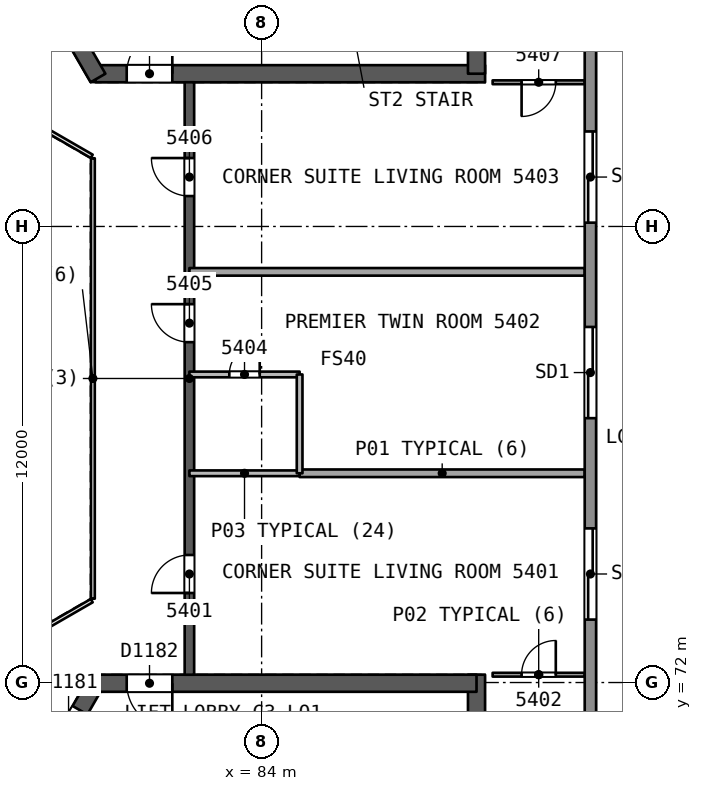
"""IFC4 building model, lengths in metres.
Left out: names, types, materials, properties, quantities, classifications, styles, units other than length and angle.
Written with IfcOpenShell. Run it as: python <this file> out.ifc"""

import sys

from ifc_helpers import new_model, si_unit, direction, frame, frame_2d, origin, place, context, subcontext, project, spatial, rectangle, extrude, element, fill, save


model = new_model("IFC4")
c1 = context("Model", 3, precision=1e-05, world=origin(), true_north=direction((0.0, 1.0)))
c2 = subcontext(c1, "Body", "Model", "MODEL_VIEW")
j1 = project(units=[si_unit("LENGTHUNIT", "METRE"), si_unit("PLANEANGLEUNIT", "RADIAN")], contexts=[c1])
p1 = place(None, origin())
s1 = spatial("IfcSite", under=j1, at=p1, CompositionType="ELEMENT")
p2 = place(p1, origin())
s2 = spatial("IfcBuilding", under=s1, at=p2, CompositionType="ELEMENT")
p3 = place(p2, frame((0.0, 0.0, 220.6)))
s3 = spatial("IfcBuildingStorey", under=s2, at=p3, CompositionType="ELEMENT", Elevation=220.6)
p4 = place(p3, frame((79.63, 88.019, 0.0), z_axis=(0.0, 0.0, 1.0), x_axis=(1.0, 0.0, 0.0)))
e1 = element("IfcWall", 1, at=p4, inside=s3, PredefinedType="SHEAR", context=c2, shape_type="SweptSolid", body=[
    extrude(rectangle(XDim=10.25, YDim=0.45, at=frame_2d((5.125, 0.0))), origin(), (0.0, 0.0, 1.0), 3.7),
])
p5 = place(p4, frame((0.82, 0.0, 0.0)))
e2 = element("IfcOpeningElement", 2, at=p5, cuts=e1, PredefinedType="OPENING", context=c2, shape_type="SweptSolid", body=[
    extrude(rectangle(XDim=1.2, YDim=2.1, at=frame_2d((0.6, 1.05))), frame((0.0, 0.235, 0.0), z_axis=(0.0, -1.0, 0.0), x_axis=(1.0, 0.0, 0.0)), (0.0, 0.0, 1.0), 0.471),
])
p6 = place(p3, frame((89.655, 88.019, 0.0), z_axis=(0.0, 0.0, 1.0), x_axis=(0.0, 1.0, 0.0)))
e3 = element("IfcWall", 3, at=p6, inside=s3, PredefinedType="SHEAR", context=c2, shape_type="SweptSolid", body=[
    extrude(rectangle(XDim=14.108, YDim=0.45, at=frame_2d((7.054, 0.0))), origin(), (0.0, 0.0, 1.0), 3.7),
])
p7 = place(p3, frame((74.617, 96.701, 0.0), z_axis=(0.0, 0.0, 1.0), x_axis=(0.499994385119, -0.866028645513, 0.0)))
e4 = element("IfcWall", 4, at=p7, inside=s3, PredefinedType="SHEAR", context=c2, shape_type="SweptSolid", body=[
    extrude(rectangle(XDim=10.155, YDim=0.45, at=frame_2d((5.077, 0.0))), origin(), (0.0, 0.0, 1.0), 3.7),
])
p8 = place(p7, frame((8.005, 0.0, 0.0)))
e5 = element("IfcOpeningElement", 5, at=p8, cuts=e4, PredefinedType="OPENING", context=c2, shape_type="SweptSolid", body=[
    extrude(rectangle(XDim=1.2, YDim=2.1, at=frame_2d((0.6, 1.05))), frame((0.0, 0.235, 0.0), z_axis=(0.0, -1.0, 0.0), x_axis=(1.0, 0.0, 0.0)), (0.0, 0.0, 1.0), 0.471),
])
p9 = place(p3, frame((79.63, 71.981, 0.0), z_axis=(0.0, 0.0, 1.0), x_axis=(-0.500002171595, -0.86602415001, 0.0)))
e6 = element("IfcWall", 6, at=p9, inside=s3, PredefinedType="SHEAR", context=c2, shape_type="SweptSolid", body=[
    extrude(rectangle(XDim=10.25, YDim=0.45, at=frame_2d((5.125, 0.0))), origin(), (0.0, 0.0, 1.0), 3.7),
])
p10 = place(p9, frame((0.82, 0.0, 0.0)))
e7 = element("IfcOpeningElement", 7, at=p10, cuts=e6, PredefinedType="OPENING", context=c2, shape_type="SweptSolid", body=[
    extrude(rectangle(XDim=1.2, YDim=2.1, at=frame_2d((0.6, 1.05))), frame((0.0, 0.235, 0.0), z_axis=(0.0, -1.0, 0.0), x_axis=(1.0, 0.0, 0.0)), (0.0, 0.0, 1.0), 0.471),
])
p11 = place(p3, frame((89.655, 58.002, 0.0), z_axis=(0.0, 0.0, 1.0), x_axis=(0.0, 1.0, 0.0)))
e8 = element("IfcWall", 8, at=p11, inside=s3, PredefinedType="SHEAR", context=c2, shape_type="SweptSolid", body=[
    extrude(rectangle(XDim=14.204, YDim=0.45, at=frame_2d((7.102, 0.0))), origin(), (0.0, 0.0, 1.0), 3.7),
])
p12 = place(p3, frame((89.655, 71.981, 0.0), z_axis=(0.0, 0.0, 1.0), x_axis=(-1.0, 0.0, 0.0)))
e9 = element("IfcWall", 9, at=p12, inside=s3, PredefinedType="SHEAR", context=c2, shape_type="SweptSolid", body=[
    extrude(rectangle(XDim=10.155, YDim=0.45, at=frame_2d((5.078, 0.0))), origin(), (0.0, 0.0, 1.0), 3.7),
])
p13 = place(p12, frame((8.005, 0.0, 0.0)))
e10 = element("IfcOpeningElement", 10, at=p13, cuts=e9, PredefinedType="OPENING", context=c2, shape_type="SweptSolid", body=[
    extrude(rectangle(XDim=1.2, YDim=2.1, at=frame_2d((0.6, 1.05))), frame((0.0, 0.235, 0.0), z_axis=(0.0, -1.0, 0.0), x_axis=(1.0, 0.0, 0.0)), (0.0, 0.0, 1.0), 0.471),
])
p14 = place(p3, frame((82.1, 72.206, 0.0), z_axis=(0.0, 0.0, 1.0), x_axis=(0.0, 1.0, 0.0)))
e11 = element("IfcWall", 11, at=p14, inside=s3, PredefinedType="SHEAR", context=c2, shape_type="SweptSolid", body=[
    extrude(rectangle(XDim=15.588, YDim=0.25, at=frame_2d((7.794, 0.0))), origin(), (0.0, 0.0, 1.0), 3.3),
])
p15 = place(p14, frame((2.15, 0.0, 0.0)))
e12 = element("IfcOpeningElement", 12, at=p15, cuts=e11, PredefinedType="OPENING", context=c2, shape_type="SweptSolid", body=[
    extrude(rectangle(XDim=1.0, YDim=2.1, at=frame_2d((0.5, 1.05))), frame((0.0, 0.135, 0.0), z_axis=(0.0, -1.0, 0.0), x_axis=(1.0, 0.0, 0.0)), (0.0, 0.0, 1.0), 0.271),
])
p16 = place(p14, frame((8.75, 0.0, 0.0)))
e13 = element("IfcOpeningElement", 13, at=p16, cuts=e11, PredefinedType="OPENING", context=c2, shape_type="SweptSolid", body=[
    extrude(rectangle(XDim=1.0, YDim=2.1, at=frame_2d((0.5, 1.05))), frame((0.0, 0.135, 0.0), z_axis=(0.0, -1.0, 0.0), x_axis=(1.0, 0.0, 0.0)), (0.0, 0.0, 1.0), 0.271),
])
p17 = place(p14, frame((12.594, 0.0, 0.0)))
e14 = element("IfcOpeningElement", 14, at=p17, cuts=e11, PredefinedType="OPENING", context=c2, shape_type="SweptSolid", body=[
    extrude(rectangle(XDim=1.0, YDim=2.1, at=frame_2d((0.5, 1.05))), frame((0.0, 0.135, 0.0), z_axis=(0.0, -1.0, 0.0), x_axis=(1.0, 0.0, 0.0)), (0.0, 0.0, 1.0), 0.271),
])
p18 = place(p3, frame((90.079, 72.206, 0.0), z_axis=(0.0, 0.0, 1.0), x_axis=(1.0, 0.0, 0.0)))
e15 = element("IfcWall", 15, at=p18, inside=s3, PredefinedType="PARTITIONING", context=c2, shape_type="SweptSolid", body=[
    extrude(rectangle(XDim=2.424, YDim=0.1, at=frame_2d((1.212, 0.0))), origin(), (0.0, 0.0, 1.0), 3.3),
])
p19 = place(p18, frame((0.762, 0.0, 0.0)))
e16 = element("IfcOpeningElement", 16, at=p19, cuts=e15, PredefinedType="OPENING", context=c2, shape_type="SweptSolid", body=[
    extrude(rectangle(XDim=0.9, YDim=2.1, at=frame_2d((0.45, 1.05))), frame((0.0, 0.061, 0.0), z_axis=(0.0, -1.0, 0.0), x_axis=(1.0, 0.0, 0.0)), (0.0, 0.0, 1.0), 0.121),
])
p20 = place(p3, frame((92.503, 77.506, 0.0), z_axis=(0.0, 0.0, 1.0), x_axis=(-1.0, 0.0, 0.0)))
e17 = element("IfcWall", 17, at=p20, inside=s3, PredefinedType="PARTITIONING", context=c2, shape_type="SweptSolid", body=[
    extrude(rectangle(XDim=7.503, YDim=0.2, at=frame_2d((3.751, 0.0))), origin(), (0.0, 0.0, 1.0), 3.3),
])
p21 = place(p3, frame((85.0, 77.506, 0.0), z_axis=(0.0, 0.0, 1.0), x_axis=(-1.0, 0.0, 0.0)))
e18 = element("IfcWall", 18, at=p21, inside=s3, PredefinedType="PARTITIONING", context=c2, shape_type="SweptSolid", body=[
    extrude(rectangle(XDim=2.9, YDim=0.15, at=frame_2d((1.45, 0.0))), origin(), (0.0, 0.0, 1.0), 3.3),
])
p22 = place(p3, frame((82.1, 80.106, 0.0), z_axis=(0.0, 0.0, 1.0), x_axis=(1.0, 0.0, 0.0)))
e19 = element("IfcWall", 19, at=p22, inside=s3, PredefinedType="PARTITIONING", context=c2, shape_type="SweptSolid", body=[
    extrude(rectangle(XDim=2.9, YDim=0.15, at=frame_2d((1.45, 0.0))), origin(), (0.0, 0.0, 1.0), 3.3),
])
p23 = place(p22, frame((1.05, 0.0, 0.0)))
e20 = element("IfcOpeningElement", 20, at=p23, cuts=e19, PredefinedType="OPENING", context=c2, shape_type="SweptSolid", body=[
    extrude(rectangle(XDim=0.8, YDim=2.1, at=frame_2d((0.4, 1.05))), frame((0.0, 0.085, 0.0), z_axis=(0.0, -1.0, 0.0), x_axis=(1.0, 0.0, 0.0)), (0.0, 0.0, 1.0), 0.171),
])
p24 = place(p3, frame((85.0, 80.106, 0.0), z_axis=(0.0, 0.0, 1.0), x_axis=(0.0, -1.0, 0.0)))
e21 = element("IfcWall", 21, at=p24, inside=s3, PredefinedType="PARTITIONING", context=c2, shape_type="SweptSolid", body=[
    extrude(rectangle(XDim=2.6, YDim=0.15, at=frame_2d((1.3, 0.0))), origin(), (0.0, 0.0, 1.0), 3.3),
])
p25 = place(p3, frame((92.503, 82.806, 0.0), z_axis=(0.0, 0.0, 1.0), x_axis=(-1.0, 0.0, 0.0)))
e22 = element("IfcWall", 22, at=p25, inside=s3, PredefinedType="PARTITIONING", context=c2, shape_type="SweptSolid", body=[
    extrude(rectangle(XDim=10.403, YDim=0.2, at=frame_2d((5.201, 0.0))), origin(), (0.0, 0.0, 1.0), 3.3),
])
p26 = place(p3, frame((92.503, 87.794, 0.0), z_axis=(0.0, 0.0, 1.0), x_axis=(-1.0, 0.0, 0.0)))
e23 = element("IfcWall", 23, at=p26, inside=s3, PredefinedType="PARTITIONING", context=c2, shape_type="SweptSolid", body=[
    extrude(rectangle(XDim=2.424, YDim=0.1, at=frame_2d((1.212, 0.0))), origin(), (0.0, 0.0, 1.0), 3.3),
])
p27 = place(p26, frame((0.762, 0.0, 0.0)))
e24 = element("IfcOpeningElement", 24, at=p27, cuts=e23, PredefinedType="OPENING", context=c2, shape_type="SweptSolid", body=[
    extrude(rectangle(XDim=0.9, YDim=2.1, at=frame_2d((0.45, 1.05))), frame((0.0, 0.061, 0.0), z_axis=(0.0, -1.0, 0.0), x_axis=(1.0, 0.0, 0.0)), (0.0, 0.0, 1.0), 0.121),
])
p28 = place(p3, frame((92.652, 105.381, 0.0), z_axis=(0.0, 0.0, 1.0), x_axis=(0.0, -1.0, 0.0)))
e25 = element("IfcWall", 25, at=p28, inside=s3, PredefinedType="SOLIDWALL", context=c2, shape_type="SweptSolid", body=[
    extrude(rectangle(XDim=50.762, YDim=0.3, at=frame_2d((25.381, 0.0))), origin(), (0.0, 0.0, 1.0), 3.3),
])
p29 = place(p28, frame((29.325, 0.0, 0.0)))
e26 = element("IfcOpeningElement", 26, at=p29, cuts=e25, PredefinedType="OPENING", context=c2, shape_type="SweptSolid", body=[
    extrude(rectangle(XDim=2.4, YDim=2.4, at=frame_2d((1.2, 1.2))), frame((0.0, 0.161, 0.0), z_axis=(0.0, -1.0, 0.0), x_axis=(1.0, 0.0, 0.0)), (0.0, 0.0, 1.0), 0.321),
])
p30 = place(p28, frame((39.492, 0.0, 0.0)))
e27 = element("IfcOpeningElement", 27, at=p30, cuts=e25, PredefinedType="OPENING", context=c2, shape_type="SweptSolid", body=[
    extrude(rectangle(XDim=2.4, YDim=2.4, at=frame_2d((1.2, 1.2))), frame((0.0, 0.161, 0.0), z_axis=(0.0, -1.0, 0.0), x_axis=(1.0, 0.0, 0.0)), (0.0, 0.0, 1.0), 0.321),
])
p31 = place(p28, frame((18.881, 0.0, 0.0)))
e28 = element("IfcOpeningElement", 28, at=p31, cuts=e25, PredefinedType="OPENING", context=c2, shape_type="SweptSolid", body=[
    extrude(rectangle(XDim=2.4, YDim=2.4, at=frame_2d((1.2, 1.2))), frame((0.0, 0.161, 0.0), z_axis=(0.0, -1.0, 0.0), x_axis=(1.0, 0.0, 0.0)), (0.0, 0.0, 1.0), 0.321),
])
p32 = place(p28, frame((8.878, 0.0, 0.0)))
e29 = element("IfcOpeningElement", 29, at=p32, cuts=e25, PredefinedType="OPENING", context=c2, shape_type="SweptSolid", body=[
    extrude(rectangle(XDim=2.4, YDim=2.4, at=frame_2d((1.2, 1.2))), frame((0.0, 0.161, 0.0), z_axis=(0.0, -1.0, 0.0), x_axis=(1.0, 0.0, 0.0)), (0.0, 0.0, 1.0), 0.321),
])
p33 = place(p28, frame((24.025, 0.0, 0.0)))
e30 = element("IfcOpeningElement", 30, at=p33, cuts=e25, PredefinedType="OPENING", context=c2, shape_type="SweptSolid", body=[
    extrude(rectangle(XDim=2.4, YDim=2.4, at=frame_2d((1.2, 1.2))), frame((0.0, 0.161, 0.0), z_axis=(0.0, -1.0, 0.0), x_axis=(1.0, 0.0, 0.0)), (0.0, 0.0, 1.0), 0.321),
])
p34 = place(p3, frame((44.193, 82.596, 0.0), z_axis=(0.0, 0.0, 1.0), x_axis=(0.866024521231, 0.500001528624, 0.0)))
e31 = element("IfcWall", 31, at=p34, inside=s3, PredefinedType="SOLIDWALL", context=c2, shape_type="SweptSolid", body=[
    extrude(rectangle(XDim=50.762, YDim=0.3, at=frame_2d((25.381, 0.0))), origin(), (0.0, 0.0, 1.0), 3.3),
])
p35 = place(p34, frame((24.337, 0.0, 0.0)))
e32 = element("IfcOpeningElement", 32, at=p35, cuts=e31, PredefinedType="OPENING", context=c2, shape_type="SweptSolid", body=[
    extrude(rectangle(XDim=2.4, YDim=2.4, at=frame_2d((1.2, 1.2))), frame((0.0, 0.161, 0.0), z_axis=(0.0, -1.0, 0.0), x_axis=(1.0, 0.0, 0.0)), (0.0, 0.0, 1.0), 0.321),
])
p36 = place(p34, frame((29.325, 0.0, 0.0)))
e33 = element("IfcOpeningElement", 33, at=p36, cuts=e31, PredefinedType="OPENING", context=c2, shape_type="SweptSolid", body=[
    extrude(rectangle(XDim=2.4, YDim=2.4, at=frame_2d((1.2, 1.2))), frame((0.0, 0.161, 0.0), z_axis=(0.0, -1.0, 0.0), x_axis=(1.0, 0.0, 0.0)), (0.0, 0.0, 1.0), 0.321),
])
p37 = place(p34, frame((39.492, 0.0, 0.0)))
e34 = element("IfcOpeningElement", 34, at=p37, cuts=e31, PredefinedType="OPENING", context=c2, shape_type="SweptSolid", body=[
    extrude(rectangle(XDim=2.4, YDim=2.4, at=frame_2d((1.2, 1.2))), frame((0.0, 0.161, 0.0), z_axis=(0.0, -1.0, 0.0), x_axis=(1.0, 0.0, 0.0)), (0.0, 0.0, 1.0), 0.321),
])
p38 = place(p34, frame((19.193, 0.0, 0.0)))
e35 = element("IfcOpeningElement", 35, at=p38, cuts=e31, PredefinedType="OPENING", context=c2, shape_type="SweptSolid", body=[
    extrude(rectangle(XDim=2.4, YDim=2.4, at=frame_2d((1.2, 1.2))), frame((0.0, 0.161, 0.0), z_axis=(0.0, -1.0, 0.0), x_axis=(1.0, 0.0, 0.0)), (0.0, 0.0, 1.0), 0.321),
])
p39 = place(p34, frame((8.878, 0.0, 0.0)))
e36 = element("IfcOpeningElement", 36, at=p39, cuts=e31, PredefinedType="OPENING", context=c2, shape_type="SweptSolid", body=[
    extrude(rectangle(XDim=2.4, YDim=2.4, at=frame_2d((1.2, 1.2))), frame((0.0, 0.161, 0.0), z_axis=(0.0, -1.0, 0.0), x_axis=(1.0, 0.0, 0.0)), (0.0, 0.0, 1.0), 0.321),
])
p40 = place(p3, frame((88.155, 52.022, 0.0), z_axis=(0.0, 0.0, 1.0), x_axis=(-0.866024521231, 0.500001528624, 0.0)))
e37 = element("IfcWall", 37, at=p40, inside=s3, PredefinedType="SOLIDWALL", context=c2, shape_type="SweptSolid", body=[
    extrude(rectangle(XDim=50.762, YDim=0.3, at=frame_2d((25.381, 0.0))), origin(), (0.0, 0.0, 1.0), 3.3),
])
p41 = place(p40, frame((23.402, 0.0, 0.0)))
e38 = element("IfcOpeningElement", 38, at=p41, cuts=e37, PredefinedType="OPENING", context=c2, shape_type="SweptSolid", body=[
    extrude(rectangle(XDim=2.4, YDim=2.4, at=frame_2d((1.2, 1.2))), frame((0.0, 0.161, 0.0), z_axis=(0.0, -1.0, 0.0), x_axis=(1.0, 0.0, 0.0)), (0.0, 0.0, 1.0), 0.321),
])
p42 = place(p40, frame((29.013, 0.0, 0.0)))
e39 = element("IfcOpeningElement", 39, at=p42, cuts=e37, PredefinedType="OPENING", context=c2, shape_type="SweptSolid", body=[
    extrude(rectangle(XDim=2.4, YDim=2.4, at=frame_2d((1.2, 1.2))), frame((0.0, 0.161, 0.0), z_axis=(0.0, -1.0, 0.0), x_axis=(1.0, 0.0, 0.0)), (0.0, 0.0, 1.0), 0.321),
])
p43 = place(p40, frame((39.492, 0.0, 0.0)))
e40 = element("IfcOpeningElement", 40, at=p43, cuts=e37, PredefinedType="OPENING", context=c2, shape_type="SweptSolid", body=[
    extrude(rectangle(XDim=2.4, YDim=2.4, at=frame_2d((1.2, 1.2))), frame((0.0, 0.161, 0.0), z_axis=(0.0, -1.0, 0.0), x_axis=(1.0, 0.0, 0.0)), (0.0, 0.0, 1.0), 0.321),
])
p44 = place(p40, frame((18.569, 0.0, 0.0)))
e41 = element("IfcOpeningElement", 41, at=p44, cuts=e37, PredefinedType="OPENING", context=c2, shape_type="SweptSolid", body=[
    extrude(rectangle(XDim=2.4, YDim=2.4, at=frame_2d((1.2, 1.2))), frame((0.0, 0.161, 0.0), z_axis=(0.0, -1.0, 0.0), x_axis=(1.0, 0.0, 0.0)), (0.0, 0.0, 1.0), 0.321),
])
p45 = place(p40, frame((8.878, 0.0, 0.0)))
e42 = element("IfcOpeningElement", 42, at=p45, cuts=e37, PredefinedType="OPENING", context=c2, shape_type="SweptSolid", body=[
    extrude(rectangle(XDim=2.4, YDim=2.4, at=frame_2d((1.2, 1.2))), frame((0.0, 0.161, 0.0), z_axis=(0.0, -1.0, 0.0), x_axis=(1.0, 0.0, 0.0)), (0.0, 0.0, 1.0), 0.321),
])
p46 = place(p3, frame((79.56, 74.206, 0.0), z_axis=(0.0, 0.0, 1.0), x_axis=(0.0, 1.0, 0.0)))
e43 = element("IfcWall", 43, at=p46, inside=s3, PredefinedType="PARTITIONING", context=c2, shape_type="SweptSolid", body=[
    extrude(rectangle(XDim=11.588, YDim=0.1, at=frame_2d((5.794, 0.0))), origin(), (0.0, 0.0, 1.0), 3.3),
])
for number, where, z_axis, x_axis in (
    (44, (79.53, 85.846, 0.0), (0.0, 0.0, 1.0), (-0.866, 0.5, 0.0)),
    (45, (77.798, 73.154, 0.0), (0.0, 0.0, 1.0), (0.866, 0.5, 0.0)),
):
    element("IfcWall", number, at=place(p3, frame(where, z_axis=z_axis, x_axis=x_axis)), inside=s3, PredefinedType="PARTITIONING", context=c2, shape_type="SweptSolid", body=[
        extrude(rectangle(XDim=2.0, YDim=0.1, at=frame_2d((1.0, 0.0))), origin(), (0.0, 0.0, 1.0), 3.3),
    ])
p47 = place(p15, origin())
e46 = element("IfcDoor", 46, at=p47, inside=s3, OperationType="SINGLE_SWING_LEFT", PredefinedType="NOTDEFINED", context=c2, shape_type="SweptSolid", body=[
    extrude(rectangle(XDim=1.0, YDim=2.1, at=frame_2d((0.5, 1.05))), frame((0.0, 0.025, 0.0), z_axis=(0.0, -1.0, 0.0), x_axis=(1.0, 0.0, 0.0)), (0.0, 0.0, 1.0), 0.05),
])
fill(e12, e46)
p48 = place(p19, origin())
e47 = element("IfcDoor", 47, at=p48, inside=s3, OperationType="SINGLE_SWING_RIGHT", PredefinedType="NOTDEFINED", context=c2, shape_type="SweptSolid", body=[
    extrude(rectangle(XDim=0.9, YDim=2.1, at=frame_2d((0.45, 1.05))), frame((0.0, 0.025, 0.0), z_axis=(0.0, -1.0, 0.0), x_axis=(1.0, 0.0, 0.0)), (0.0, 0.0, 1.0), 0.05),
])
fill(e16, e47)
p49 = place(p23, origin())
e48 = element("IfcDoor", 48, at=p49, inside=s3, OperationType="SINGLE_SWING_RIGHT", PredefinedType="NOTDEFINED", context=c2, shape_type="SweptSolid", body=[
    extrude(rectangle(XDim=0.8, YDim=2.1, at=frame_2d((0.4, 1.05))), frame((0.0, 0.025, 0.0), z_axis=(0.0, -1.0, 0.0), x_axis=(1.0, 0.0, 0.0)), (0.0, 0.0, 1.0), 0.05),
])
fill(e20, e48)
p50 = place(p16, origin())
e49 = element("IfcDoor", 49, at=p50, inside=s3, OperationType="SINGLE_SWING_RIGHT", PredefinedType="NOTDEFINED", context=c2, shape_type="SweptSolid", body=[
    extrude(rectangle(XDim=1.0, YDim=2.1, at=frame_2d((0.5, 1.05))), frame((0.0, 0.025, 0.0), z_axis=(0.0, -1.0, 0.0), x_axis=(1.0, 0.0, 0.0)), (0.0, 0.0, 1.0), 0.05),
])
fill(e13, e49)
p51 = place(p17, origin())
e50 = element("IfcDoor", 50, at=p51, inside=s3, OperationType="SINGLE_SWING_RIGHT", PredefinedType="NOTDEFINED", context=c2, shape_type="SweptSolid", body=[
    extrude(rectangle(XDim=1.0, YDim=2.1, at=frame_2d((0.5, 1.05))), frame((0.0, 0.025, 0.0), z_axis=(0.0, -1.0, 0.0), x_axis=(1.0, 0.0, 0.0)), (0.0, 0.0, 1.0), 0.05),
])
fill(e14, e50)
p52 = place(p27, origin())
e51 = element("IfcDoor", 51, at=p52, inside=s3, OperationType="SINGLE_SWING_RIGHT", PredefinedType="NOTDEFINED", context=c2, shape_type="SweptSolid", body=[
    extrude(rectangle(XDim=0.9, YDim=2.1, at=frame_2d((0.45, 1.05))), frame((0.0, 0.025, 0.0), z_axis=(0.0, -1.0, 0.0), x_axis=(1.0, 0.0, 0.0)), (0.0, 0.0, 1.0), 0.05),
])
fill(e24, e51)
p53 = place(p29, origin())
e52 = element("IfcDoor", 52, at=p53, inside=s3, OperationType="SLIDING_TO_LEFT", PredefinedType="NOTDEFINED", context=c2, shape_type="SweptSolid", body=[
    extrude(rectangle(XDim=2.4, YDim=2.4, at=frame_2d((1.2, 1.2))), frame((0.0, 0.025, 0.0), z_axis=(0.0, -1.0, 0.0), x_axis=(1.0, 0.0, 0.0)), (0.0, 0.0, 1.0), 0.05),
])
fill(e26, e52)
p54 = place(p31, origin())
e53 = element("IfcDoor", 53, at=p54, inside=s3, OperationType="SLIDING_TO_LEFT", PredefinedType="NOTDEFINED", context=c2, shape_type="SweptSolid", body=[
    extrude(rectangle(XDim=2.4, YDim=2.4, at=frame_2d((1.2, 1.2))), frame((0.0, 0.025, 0.0), z_axis=(0.0, -1.0, 0.0), x_axis=(1.0, 0.0, 0.0)), (0.0, 0.0, 1.0), 0.05),
])
fill(e28, e53)
p55 = place(p33, origin())
e54 = element("IfcDoor", 54, at=p55, inside=s3, OperationType="SLIDING_TO_LEFT", PredefinedType="NOTDEFINED", context=c2, shape_type="SweptSolid", body=[
    extrude(rectangle(XDim=2.4, YDim=2.4, at=frame_2d((1.2, 1.2))), frame((0.0, 0.025, 0.0), z_axis=(0.0, -1.0, 0.0), x_axis=(1.0, 0.0, 0.0)), (0.0, 0.0, 1.0), 0.05),
])
fill(e30, e54)
p56 = place(p5, origin())
e55 = element("IfcDoor", 55, at=p56, inside=s3, OperationType="SINGLE_SWING_RIGHT", PredefinedType="NOTDEFINED", context=c2, shape_type="SweptSolid", body=[
    extrude(rectangle(XDim=1.2, YDim=2.1, at=frame_2d((0.6, 1.05))), frame((0.0, 0.025, 0.0), z_axis=(0.0, -1.0, 0.0), x_axis=(1.0, 0.0, 0.0)), (0.0, 0.0, 1.0), 0.05),
])
fill(e2, e55)
p57 = place(p10, origin())
e56 = element("IfcDoor", 56, at=p57, inside=s3, OperationType="SINGLE_SWING_RIGHT", PredefinedType="NOTDEFINED", context=c2, shape_type="SweptSolid", body=[
    extrude(rectangle(XDim=1.2, YDim=2.1, at=frame_2d((0.6, 1.05))), frame((0.0, 0.025, 0.0), z_axis=(0.0, -1.0, 0.0), x_axis=(1.0, 0.0, 0.0)), (0.0, 0.0, 1.0), 0.05),
])
fill(e7, e56)
p58 = place(p13, origin())
e57 = element("IfcDoor", 57, at=p58, inside=s3, OperationType="SINGLE_SWING_LEFT", PredefinedType="NOTDEFINED", context=c2, shape_type="SweptSolid", body=[
    extrude(rectangle(XDim=1.2, YDim=2.1, at=frame_2d((0.6, 1.05))), frame((0.0, 0.025, 0.0), z_axis=(0.0, -1.0, 0.0), x_axis=(1.0, 0.0, 0.0)), (0.0, 0.0, 1.0), 0.05),
])
fill(e10, e57)
save(model, sys.argv[1])
